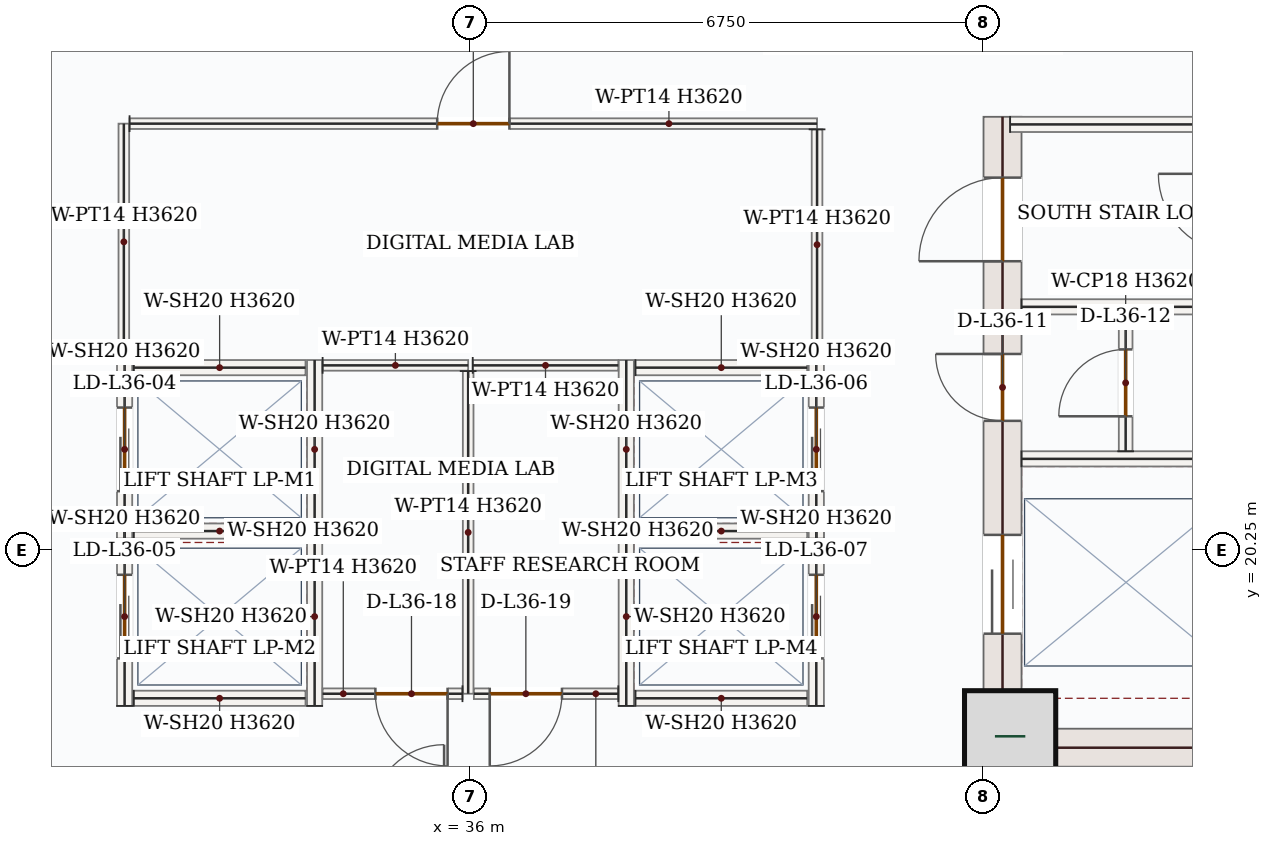
"""IFC4 building model, lengths in metres.
Left out: names, types, materials, properties, quantities, classifications, styles, units other than length and angle.
Written with IfcOpenShell. Run it as: python <this file> out.ifc"""

import sys

from ifc_helpers import new_model, si_unit, direction, frame, frame_2d, origin, origin_2d, place, context, subcontext, project, spatial, rectangle, extrude, source, transform, mapped, element, fill, save


model = new_model("IFC4")
c1 = context("Model", 3, precision=1e-05, world=origin(), true_north=direction((0.0, 1.0)))
c2 = subcontext(c1, "Body", "Model", "MODEL_VIEW")
j1 = project(units=[si_unit("LENGTHUNIT", "METRE"), si_unit("PLANEANGLEUNIT", "RADIAN")], contexts=[c1])
p1 = place(None, origin())
s1 = spatial("IfcSite", under=j1, at=p1, CompositionType="ELEMENT")
p2 = place(p1, origin())
s2 = spatial("IfcBuilding", under=s1, at=p2, CompositionType="ELEMENT")
p3 = place(p2, frame((0.0, 0.0, 159.0)))
s3 = spatial("IfcBuildingStorey", under=s2, at=p3, CompositionType="ELEMENT", Elevation=159.0)
p4 = place(p3, frame((43.0, 17.4, 0.0), z_axis=(0.0, 0.0, 1.0), x_axis=(0.0, 1.0, 0.0)))
e1 = element("IfcWall", 1, at=p4, inside=s3, PredefinedType="SHEAR", context=c2, shape_type="SweptSolid", body=[
    extrude(rectangle(XDim=8.55, YDim=0.5, at=frame_2d((4.275, 0.0))), origin(), (0.0, 0.0, 1.0), 3.62),
])
p5 = place(p4, frame((6.65, 0.0, 0.0)))
e2 = element("IfcOpeningElement", 2, at=p5, cuts=e1, PredefinedType="OPENING", context=c2, shape_type="SweptSolid", body=[
    extrude(rectangle(XDim=1.1, YDim=2.2, at=frame_2d((0.55, 1.1))), frame((0.0, 0.26, 0.0), z_axis=(0.0, -1.0, 0.0), x_axis=(1.0, 0.0, 0.0)), (0.0, 0.0, 1.0), 0.52),
])
p6 = place(p4, frame((1.75, 0.0, 0.0)))
e3 = element("IfcOpeningElement", 3, at=p6, cuts=e1, PredefinedType="OPENING", context=c2, shape_type="SweptSolid", body=[
    extrude(rectangle(XDim=1.3, YDim=2.2, at=frame_2d((0.65, 1.1))), frame((0.0, 0.26, 0.0), z_axis=(0.0, -1.0, 0.0), x_axis=(1.0, 0.0, 0.0)), (0.0, 0.0, 1.0), 0.52),
])
p7 = place(p4, frame((4.55, 0.0, 0.0)))
e4 = element("IfcOpeningElement", 4, at=p7, cuts=e1, PredefinedType="OPENING", context=c2, shape_type="SweptSolid", body=[
    extrude(rectangle(XDim=0.88, YDim=2.1, at=frame_2d((0.44, 1.05))), frame((0.0, 0.26, 0.0), z_axis=(0.0, -1.0, 0.0), x_axis=(1.0, 0.0, 0.0)), (0.0, 0.0, 1.0), 0.52),
])
m1 = source(origin(), c2, "Body", "SweptSolid", [
    extrude(rectangle(XDim=7.0, YDim=0.5, at=frame_2d((3.5, 0.0))), origin(), (0.0, 0.0, 1.0), 3.62),
])
p8 = place(p3, frame((43.25, 17.65, 0.0), z_axis=(0.0, 0.0, 1.0), x_axis=(1.0, 0.0, 0.0)))
e5 = element("IfcWall", 5, at=p8, inside=s3, PredefinedType="SHEAR", context=c2, shape_type="MappedRepresentation", body=[
    mapped(m1, transform((0.0, 0.0, 0.0), x_axis=(1.0, 0.0, 0.0), y_axis=(0.0, 1.0, 0.0), z_axis=(0.0, 0.0, 1.0), scale=1.0)),
])
m2 = source(origin(), c2, "Body", "SweptSolid", [
    extrude(rectangle(XDim=1.2, YDim=1.2, at=origin_2d()), origin(), (0.0, 0.0, 1.0), 3.9),
])
p9 = place(p3, frame((43.1, 17.8, 0.0), z_axis=(0.0, 0.0, 1.0), x_axis=(1.0, 0.0, 0.0)))
e6 = element("IfcColumn", 6, at=p9, inside=s3, PredefinedType="COLUMN", context=c2, shape_type="MappedRepresentation", body=[
    mapped(m2, transform((0.0, 0.0, 0.0), x_axis=(1.0, 0.0, 0.0), y_axis=(0.0, 1.0, 0.0), z_axis=(0.0, 0.0, 1.0), scale=1.0)),
])
m3 = source(origin(), c2, "Body", "SweptSolid", [
    extrude(rectangle(XDim=3.0, YDim=0.2, at=frame_2d((1.5, 0.0))), origin(), (0.0, 0.0, 1.0), 3.62),
])
p10 = place(p3, frame((43.1, 25.85, 0.0), z_axis=(0.0, 0.0, 1.0), x_axis=(1.0, 0.0, 0.0)))
e7 = element("IfcWall", 7, at=p10, inside=s3, PredefinedType="SOLIDWALL", context=c2, shape_type="MappedRepresentation", body=[
    mapped(m3, transform((0.0, 0.0, 0.0), x_axis=(1.0, 0.0, 0.0), y_axis=(0.0, 1.0, 0.0), z_axis=(0.0, 0.0, 1.0), scale=1.0)),
])
m4 = source(origin(), c2, "Body", "SweptSolid", [
    extrude(rectangle(XDim=2.75, YDim=0.2, at=frame_2d((1.375, 0.0))), origin(), (0.0, 0.0, 1.0), 3.62),
])
for number, where, z_axis, x_axis in (
    (8, (43.25, 23.45, 0.0), (0.0, 0.0, 1.0), (1.0, 0.0, 0.0)),
    (9, (43.25, 21.45, 0.0), (0.0, 0.0, 1.0), (1.0, 0.0, 0.0)),
):
    element("IfcWall", number, at=place(p3, frame(where, z_axis=z_axis, x_axis=x_axis)), inside=s3, PredefinedType="SOLIDWALL", context=c2, shape_type="MappedRepresentation", body=[
        mapped(m4, transform((0.0, 0.0, 0.0), x_axis=(1.0, 0.0, 0.0), y_axis=(0.0, 1.0, 0.0), z_axis=(0.0, 0.0, 1.0), scale=1.0)),
    ])
p11 = place(p3, frame((44.62, 21.55, 0.0), z_axis=(0.0, 0.0, 1.0), x_axis=(0.0, 1.0, 0.0)))
e10 = element("IfcWall", 10, at=p11, inside=s3, PredefinedType="PARTITIONING", context=c2, shape_type="SweptSolid", body=[
    extrude(rectangle(XDim=1.8, YDim=0.18, at=frame_2d((0.9, 0.0))), origin(), (0.0, 0.0, 1.0), 3.62),
])
p12 = place(p11, frame((0.46, 0.0, 0.0)))
e11 = element("IfcOpeningElement", 11, at=p12, cuts=e10, PredefinedType="OPENING", context=c2, shape_type="SweptSolid", body=[
    extrude(rectangle(XDim=0.88, YDim=2.1, at=frame_2d((0.44, 1.05))), frame((0.0, 0.1, 0.0), z_axis=(0.0, -1.0, 0.0), x_axis=(1.0, 0.0, 0.0)), (0.0, 0.0, 1.0), 0.2),
])
p13 = place(p3, frame((31.45, 20.4, 0.0), z_axis=(0.0, 0.0, 1.0), x_axis=(0.0, 1.0, 0.0)))
e12 = element("IfcWall", 12, at=p13, inside=s3, PredefinedType="SOLIDWALL", context=c2, shape_type="SweptSolid", body=[
    extrude(rectangle(XDim=2.35, YDim=0.2, at=frame_2d((1.175, 0.0))), origin(), (0.0, 0.0, 1.0), 3.62),
])
p14 = place(p13, frame((0.625, 0.0, 0.0)))
e13 = element("IfcOpeningElement", 13, at=p14, cuts=e12, PredefinedType="OPENING", context=c2, shape_type="SweptSolid", body=[
    extrude(rectangle(XDim=1.1, YDim=2.15, at=frame_2d((0.55, 1.075))), frame((0.0, 0.11, 0.0), z_axis=(0.0, -1.0, 0.0), x_axis=(1.0, 0.0, 0.0)), (0.0, 0.0, 1.0), 0.22),
])
m5 = source(origin(), c2, "Body", "SweptSolid", [
    extrude(rectangle(XDim=2.35, YDim=0.2, at=frame_2d((1.175, 0.0))), origin(), (0.0, 0.0, 1.0), 3.62),
])
p15 = place(p3, frame((33.95, 20.4, 0.0), z_axis=(0.0, 0.0, 1.0), x_axis=(0.0, 1.0, 0.0)))
e14 = element("IfcWall", 14, at=p15, inside=s3, PredefinedType="SOLIDWALL", context=c2, shape_type="MappedRepresentation", body=[
    mapped(m5, transform((0.0, 0.0, 0.0), x_axis=(1.0, 0.0, 0.0), y_axis=(0.0, 1.0, 0.0), z_axis=(0.0, 0.0, 1.0), scale=1.0)),
])
m6 = source(origin(), c2, "Body", "SweptSolid", [
    extrude(rectangle(XDim=2.26, YDim=0.2, at=frame_2d((1.13, 0.0))), origin(), (0.0, 0.0, 1.0), 3.62),
])
for number, where, z_axis, x_axis in (
    (15, (31.57, 20.5, 0.0), (0.0, 0.0, 1.0), (1.0, 0.0, 0.0)),
    (16, (31.57, 22.65, 0.0), (0.0, 0.0, 1.0), (1.0, 0.0, 0.0)),
):
    element("IfcWall", number, at=place(p3, frame(where, z_axis=z_axis, x_axis=x_axis)), inside=s3, PredefinedType="SOLIDWALL", context=c2, shape_type="MappedRepresentation", body=[
        mapped(m6, transform((0.0, 0.0, 0.0), x_axis=(1.0, 0.0, 0.0), y_axis=(0.0, 1.0, 0.0), z_axis=(0.0, 0.0, 1.0), scale=1.0)),
    ])
p16 = place(p3, frame((31.45, 18.2, 0.0), z_axis=(0.0, 0.0, 1.0), x_axis=(0.0, 1.0, 0.0)))
e17 = element("IfcWall", 17, at=p16, inside=s3, PredefinedType="SOLIDWALL", context=c2, shape_type="SweptSolid", body=[
    extrude(rectangle(XDim=2.35, YDim=0.2, at=frame_2d((1.175, 0.0))), origin(), (0.0, 0.0, 1.0), 3.62),
])
p17 = place(p16, frame((0.625, 0.0, 0.0)))
e18 = element("IfcOpeningElement", 18, at=p17, cuts=e17, PredefinedType="OPENING", context=c2, shape_type="SweptSolid", body=[
    extrude(rectangle(XDim=1.1, YDim=2.15, at=frame_2d((0.55, 1.075))), frame((0.0, 0.11, 0.0), z_axis=(0.0, -1.0, 0.0), x_axis=(1.0, 0.0, 0.0)), (0.0, 0.0, 1.0), 0.22),
])
p18 = place(p3, frame((33.95, 18.2, 0.0), z_axis=(0.0, 0.0, 1.0), x_axis=(0.0, 1.0, 0.0)))
e19 = element("IfcWall", 19, at=p18, inside=s3, PredefinedType="SOLIDWALL", context=c2, shape_type="MappedRepresentation", body=[
    mapped(m5, transform((0.0, 0.0, 0.0), x_axis=(1.0, 0.0, 0.0), y_axis=(0.0, 1.0, 0.0), z_axis=(0.0, 0.0, 1.0), scale=1.0)),
])
p19 = place(p3, frame((31.57, 18.3, 0.0), z_axis=(0.0, 0.0, 1.0), x_axis=(1.0, 0.0, 0.0)))
e20 = element("IfcWall", 20, at=p19, inside=s3, PredefinedType="SOLIDWALL", context=c2, shape_type="MappedRepresentation", body=[
    mapped(m6, transform((0.0, 0.0, 0.0), x_axis=(1.0, 0.0, 0.0), y_axis=(0.0, 1.0, 0.0), z_axis=(0.0, 0.0, 1.0), scale=1.0)),
])
p20 = place(p3, frame((38.05, 20.4, 0.0), z_axis=(0.0, 0.0, 1.0), x_axis=(0.0, 1.0, 0.0)))
e21 = element("IfcWall", 21, at=p20, inside=s3, PredefinedType="SOLIDWALL", context=c2, shape_type="MappedRepresentation", body=[
    mapped(m5, transform((0.0, 0.0, 0.0), x_axis=(1.0, 0.0, 0.0), y_axis=(0.0, 1.0, 0.0), z_axis=(0.0, 0.0, 1.0), scale=1.0)),
])
p21 = place(p3, frame((40.55, 20.4, 0.0), z_axis=(0.0, 0.0, 1.0), x_axis=(0.0, 1.0, 0.0)))
e22 = element("IfcWall", 22, at=p21, inside=s3, PredefinedType="SOLIDWALL", context=c2, shape_type="SweptSolid", body=[
    extrude(rectangle(XDim=2.35, YDim=0.2, at=frame_2d((1.175, 0.0))), origin(), (0.0, 0.0, 1.0), 3.62),
])
p22 = place(p21, frame((0.625, 0.0, 0.0)))
e23 = element("IfcOpeningElement", 23, at=p22, cuts=e22, PredefinedType="OPENING", context=c2, shape_type="SweptSolid", body=[
    extrude(rectangle(XDim=1.1, YDim=2.15, at=frame_2d((0.55, 1.075))), frame((0.0, 0.11, 0.0), z_axis=(0.0, -1.0, 0.0), x_axis=(1.0, 0.0, 0.0)), (0.0, 0.0, 1.0), 0.22),
])
for number, where, z_axis, x_axis in (
    (24, (38.17, 20.5, 0.0), (0.0, 0.0, 1.0), (1.0, 0.0, 0.0)),
    (25, (38.17, 22.65, 0.0), (0.0, 0.0, 1.0), (1.0, 0.0, 0.0)),
):
    element("IfcWall", number, at=place(p3, frame(where, z_axis=z_axis, x_axis=x_axis)), inside=s3, PredefinedType="SOLIDWALL", context=c2, shape_type="MappedRepresentation", body=[
        mapped(m6, transform((0.0, 0.0, 0.0), x_axis=(1.0, 0.0, 0.0), y_axis=(0.0, 1.0, 0.0), z_axis=(0.0, 0.0, 1.0), scale=1.0)),
    ])
p23 = place(p3, frame((38.05, 18.2, 0.0), z_axis=(0.0, 0.0, 1.0), x_axis=(0.0, 1.0, 0.0)))
e26 = element("IfcWall", 26, at=p23, inside=s3, PredefinedType="SOLIDWALL", context=c2, shape_type="MappedRepresentation", body=[
    mapped(m5, transform((0.0, 0.0, 0.0), x_axis=(1.0, 0.0, 0.0), y_axis=(0.0, 1.0, 0.0), z_axis=(0.0, 0.0, 1.0), scale=1.0)),
])
p24 = place(p3, frame((40.55, 18.2, 0.0), z_axis=(0.0, 0.0, 1.0), x_axis=(0.0, 1.0, 0.0)))
e27 = element("IfcWall", 27, at=p24, inside=s3, PredefinedType="SOLIDWALL", context=c2, shape_type="SweptSolid", body=[
    extrude(rectangle(XDim=2.35, YDim=0.2, at=frame_2d((1.175, 0.0))), origin(), (0.0, 0.0, 1.0), 3.62),
])
p25 = place(p24, frame((0.625, 0.0, 0.0)))
e28 = element("IfcOpeningElement", 28, at=p25, cuts=e27, PredefinedType="OPENING", context=c2, shape_type="SweptSolid", body=[
    extrude(rectangle(XDim=1.1, YDim=2.15, at=frame_2d((0.55, 1.075))), frame((0.0, 0.11, 0.0), z_axis=(0.0, -1.0, 0.0), x_axis=(1.0, 0.0, 0.0)), (0.0, 0.0, 1.0), 0.22),
])
p26 = place(p3, frame((38.17, 18.3, 0.0), z_axis=(0.0, 0.0, 1.0), x_axis=(1.0, 0.0, 0.0)))
e29 = element("IfcWall", 29, at=p26, inside=s3, PredefinedType="SOLIDWALL", context=c2, shape_type="MappedRepresentation", body=[
    mapped(m6, transform((0.0, 0.0, 0.0), x_axis=(1.0, 0.0, 0.0), y_axis=(0.0, 1.0, 0.0), z_axis=(0.0, 0.0, 1.0), scale=1.0)),
])
m7 = source(origin(), c2, "Body", "SweptSolid", [
    extrude(rectangle(XDim=1.915, YDim=0.14, at=frame_2d((0.958, 0.0))), origin(), (0.0, 0.0, 1.0), 3.62),
])
p27 = place(p3, frame((34.055, 22.68, 0.0), z_axis=(0.0, 0.0, 1.0), x_axis=(1.0, 0.0, 0.0)))
e30 = element("IfcWall", 30, at=p27, inside=s3, PredefinedType="PARTITIONING", context=c2, shape_type="MappedRepresentation", body=[
    mapped(m7, transform((0.0, 0.0, 0.0), x_axis=(1.0, 0.0, 0.0), y_axis=(0.0, 1.0, 0.0), z_axis=(0.0, 0.0, 1.0), scale=1.0)),
])
m8 = source(origin(), c2, "Body", "SweptSolid", [
    extrude(rectangle(XDim=4.245, YDim=0.14, at=frame_2d((2.123, 0.0))), origin(), (0.0, 0.0, 1.0), 3.62),
])
p28 = place(p3, frame((35.97, 22.605, 0.0), z_axis=(0.0, 0.0, 1.0), x_axis=(0.0, -1.0, 0.0)))
e31 = element("IfcWall", 31, at=p28, inside=s3, PredefinedType="PARTITIONING", context=c2, shape_type="MappedRepresentation", body=[
    mapped(m8, transform((0.0, 0.0, 0.0), x_axis=(1.0, 0.0, 0.0), y_axis=(0.0, 1.0, 0.0), z_axis=(0.0, 0.0, 1.0), scale=1.0)),
])
p29 = place(p3, frame((35.895, 18.36, 0.0), z_axis=(0.0, 0.0, 1.0), x_axis=(-1.0, 0.0, 0.0)))
e32 = element("IfcWall", 32, at=p29, inside=s3, PredefinedType="PARTITIONING", context=c2, shape_type="SweptSolid", body=[
    extrude(rectangle(XDim=1.84, YDim=0.14, at=frame_2d((0.92, 0.0))), origin(), (0.0, 0.0, 1.0), 3.62),
])
p30 = place(p29, frame((0.196, 0.0, 0.0)))
e33 = element("IfcOpeningElement", 33, at=p30, cuts=e32, PredefinedType="OPENING", context=c2, shape_type="SweptSolid", body=[
    extrude(rectangle(XDim=0.95, YDim=2.15, at=frame_2d((0.475, 1.075))), frame((0.0, 0.08, 0.0), z_axis=(0.0, -1.0, 0.0), x_axis=(1.0, 0.0, 0.0)), (0.0, 0.0, 1.0), 0.16),
])
p31 = place(p3, frame((36.03, 22.68, 0.0), z_axis=(0.0, 0.0, 1.0), x_axis=(1.0, 0.0, 0.0)))
e34 = element("IfcWall", 34, at=p31, inside=s3, PredefinedType="PARTITIONING", context=c2, shape_type="MappedRepresentation", body=[
    mapped(m7, transform((0.0, 0.0, 0.0), x_axis=(1.0, 0.0, 0.0), y_axis=(0.0, 1.0, 0.0), z_axis=(0.0, 0.0, 1.0), scale=1.0)),
])
p32 = place(p3, frame((37.945, 18.36, 0.0), z_axis=(0.0, 0.0, 1.0), x_axis=(-1.0, 0.0, 0.0)))
e35 = element("IfcWall", 35, at=p32, inside=s3, PredefinedType="PARTITIONING", context=c2, shape_type="SweptSolid", body=[
    extrude(rectangle(XDim=1.9, YDim=0.14, at=frame_2d((0.95, 0.0))), origin(), (0.0, 0.0, 1.0), 3.62),
])
p33 = place(p32, frame((0.741, 0.0, 0.0)))
e36 = element("IfcOpeningElement", 36, at=p33, cuts=e35, PredefinedType="OPENING", context=c2, shape_type="SweptSolid", body=[
    extrude(rectangle(XDim=0.95, YDim=2.15, at=frame_2d((0.475, 1.075))), frame((0.0, 0.08, 0.0), z_axis=(0.0, -1.0, 0.0), x_axis=(1.0, 0.0, 0.0)), (0.0, 0.0, 1.0), 0.16),
])
m9 = source(origin(), c2, "Body", "SweptSolid", [
    extrude(rectangle(XDim=3.11, YDim=0.14, at=frame_2d((1.555, 0.0))), origin(), (0.0, 0.0, 1.0), 3.62),
])
p34 = place(p3, frame((31.44, 22.75, 0.0), z_axis=(0.0, 0.0, 1.0), x_axis=(0.0, 1.0, 0.0)))
e37 = element("IfcWall", 37, at=p34, inside=s3, PredefinedType="PARTITIONING", context=c2, shape_type="MappedRepresentation", body=[
    mapped(m9, transform((0.0, 0.0, 0.0), x_axis=(1.0, 0.0, 0.0), y_axis=(0.0, 1.0, 0.0), z_axis=(0.0, 0.0, 1.0), scale=1.0)),
])
p35 = place(p3, frame((31.515, 25.86, 0.0), z_axis=(0.0, 0.0, 1.0), x_axis=(1.0, 0.0, 0.0)))
e38 = element("IfcWall", 38, at=p35, inside=s3, PredefinedType="PARTITIONING", context=c2, shape_type="SweptSolid", body=[
    extrude(rectangle(XDim=9.045, YDim=0.14, at=frame_2d((4.522, 0.0))), origin(), (0.0, 0.0, 1.0), 3.62),
])
p36 = place(p35, frame((4.048, 0.0, 0.0)))
e39 = element("IfcOpeningElement", 39, at=p36, cuts=e38, PredefinedType="OPENING", context=c2, shape_type="SweptSolid", body=[
    extrude(rectangle(XDim=0.95, YDim=2.15, at=frame_2d((0.475, 1.075))), frame((0.0, 0.08, 0.0), z_axis=(0.0, -1.0, 0.0), x_axis=(1.0, 0.0, 0.0)), (0.0, 0.0, 1.0), 0.16),
])
m10 = source(origin(), c2, "Body", "SweptSolid", [
    extrude(rectangle(XDim=3.035, YDim=0.14, at=frame_2d((1.518, 0.0))), origin(), (0.0, 0.0, 1.0), 3.62),
])
p37 = place(p3, frame((40.56, 25.785, 0.0), z_axis=(0.0, 0.0, 1.0), x_axis=(0.0, -1.0, 0.0)))
e40 = element("IfcWall", 40, at=p37, inside=s3, PredefinedType="PARTITIONING", context=c2, shape_type="MappedRepresentation", body=[
    mapped(m10, transform((0.0, 0.0, 0.0), x_axis=(1.0, 0.0, 0.0), y_axis=(0.0, 1.0, 0.0), z_axis=(0.0, 0.0, 1.0), scale=1.0)),
])
m11 = source(origin(), c2, "Body", "SweptSolid", [
    extrude(rectangle(XDim=1.1, YDim=2.2, at=frame_2d((0.55, 1.1))), frame((0.0, 0.025, 0.0), z_axis=(0.0, -1.0, 0.0), x_axis=(1.0, 0.0, 0.0)), (0.0, 0.0, 1.0), 0.05),
])
p38 = place(p5, origin())
e41 = element("IfcDoor", 41, at=p38, inside=s3, OperationType="SINGLE_SWING_LEFT", PredefinedType="DOOR", context=c2, shape_type="MappedRepresentation", body=[
    mapped(m11, transform((0.0, 0.0, 0.0), x_axis=(1.0, 0.0, 0.0), y_axis=(0.0, 1.0, 0.0), z_axis=(0.0, 0.0, 1.0), scale=1.0)),
])
fill(e2, e41)
m12 = source(origin(), c2, "Body", "SweptSolid", [
    extrude(rectangle(XDim=1.3, YDim=2.2, at=frame_2d((0.65, 1.1))), frame((0.0, 0.025, 0.0), z_axis=(0.0, -1.0, 0.0), x_axis=(1.0, 0.0, 0.0)), (0.0, 0.0, 1.0), 0.05),
])
p39 = place(p6, origin())
e42 = element("IfcDoor", 42, at=p39, inside=s3, OperationType="DOUBLE_DOOR_SLIDING", PredefinedType="DOOR", context=c2, shape_type="MappedRepresentation", body=[
    mapped(m12, transform((0.0, 0.0, 0.0), x_axis=(1.0, 0.0, 0.0), y_axis=(0.0, 1.0, 0.0), z_axis=(0.0, 0.0, 1.0), scale=1.0)),
])
fill(e3, e42)
m13 = source(origin(), c2, "Body", "SweptSolid", [
    extrude(rectangle(XDim=0.88, YDim=2.1, at=frame_2d((0.44, 1.05))), frame((0.0, 0.025, 0.0), z_axis=(0.0, -1.0, 0.0), x_axis=(1.0, 0.0, 0.0)), (0.0, 0.0, 1.0), 0.05),
])
p40 = place(p7, origin())
e43 = element("IfcDoor", 43, at=p40, inside=s3, OperationType="SINGLE_SWING_RIGHT", PredefinedType="DOOR", context=c2, shape_type="MappedRepresentation", body=[
    mapped(m13, transform((0.0, 0.0, 0.0), x_axis=(1.0, 0.0, 0.0), y_axis=(0.0, 1.0, 0.0), z_axis=(0.0, 0.0, 1.0), scale=1.0)),
])
fill(e4, e43)
p41 = place(p12, origin())
e44 = element("IfcDoor", 44, at=p41, inside=s3, OperationType="SINGLE_SWING_LEFT", PredefinedType="DOOR", context=c2, shape_type="MappedRepresentation", body=[
    mapped(m13, transform((0.0, 0.0, 0.0), x_axis=(1.0, 0.0, 0.0), y_axis=(0.0, 1.0, 0.0), z_axis=(0.0, 0.0, 1.0), scale=1.0)),
])
fill(e11, e44)
m14 = source(origin(), c2, "Body", "SweptSolid", [
    extrude(rectangle(XDim=1.1, YDim=2.15, at=frame_2d((0.55, 1.075))), frame((0.0, 0.025, 0.0), z_axis=(0.0, -1.0, 0.0), x_axis=(1.0, 0.0, 0.0)), (0.0, 0.0, 1.0), 0.05),
])
p42 = place(p14, origin())
e45 = element("IfcDoor", 45, at=p42, inside=s3, OperationType="DOUBLE_DOOR_SLIDING", PredefinedType="DOOR", context=c2, shape_type="MappedRepresentation", body=[
    mapped(m14, transform((0.0, 0.0, 0.0), x_axis=(1.0, 0.0, 0.0), y_axis=(0.0, 1.0, 0.0), z_axis=(0.0, 0.0, 1.0), scale=1.0)),
])
fill(e13, e45)
p43 = place(p17, origin())
e46 = element("IfcDoor", 46, at=p43, inside=s3, OperationType="DOUBLE_DOOR_SLIDING", PredefinedType="DOOR", context=c2, shape_type="MappedRepresentation", body=[
    mapped(m14, transform((0.0, 0.0, 0.0), x_axis=(1.0, 0.0, 0.0), y_axis=(0.0, 1.0, 0.0), z_axis=(0.0, 0.0, 1.0), scale=1.0)),
])
fill(e18, e46)
p44 = place(p22, origin())
e47 = element("IfcDoor", 47, at=p44, inside=s3, OperationType="DOUBLE_DOOR_SLIDING", PredefinedType="DOOR", context=c2, shape_type="MappedRepresentation", body=[
    mapped(m14, transform((0.0, 0.0, 0.0), x_axis=(1.0, 0.0, 0.0), y_axis=(0.0, 1.0, 0.0), z_axis=(0.0, 0.0, 1.0), scale=1.0)),
])
fill(e23, e47)
p45 = place(p25, origin())
e48 = element("IfcDoor", 48, at=p45, inside=s3, OperationType="DOUBLE_DOOR_SLIDING", PredefinedType="DOOR", context=c2, shape_type="MappedRepresentation", body=[
    mapped(m14, transform((0.0, 0.0, 0.0), x_axis=(1.0, 0.0, 0.0), y_axis=(0.0, 1.0, 0.0), z_axis=(0.0, 0.0, 1.0), scale=1.0)),
])
fill(e28, e48)
m15 = source(origin(), c2, "Body", "SweptSolid", [
    extrude(rectangle(XDim=0.95, YDim=2.15, at=frame_2d((0.475, 1.075))), frame((0.0, 0.025, 0.0), z_axis=(0.0, -1.0, 0.0), x_axis=(1.0, 0.0, 0.0)), (0.0, 0.0, 1.0), 0.05),
])
p46 = place(p36, origin())
e49 = element("IfcDoor", 49, at=p46, inside=s3, OperationType="SINGLE_SWING_RIGHT", PredefinedType="DOOR", context=c2, shape_type="MappedRepresentation", body=[
    mapped(m15, transform((0.0, 0.0, 0.0), x_axis=(1.0, 0.0, 0.0), y_axis=(0.0, 1.0, 0.0), z_axis=(0.0, 0.0, 1.0), scale=1.0)),
])
fill(e39, e49)
p47 = place(p30, origin())
e50 = element("IfcDoor", 50, at=p47, inside=s3, OperationType="SINGLE_SWING_LEFT", PredefinedType="DOOR", context=c2, shape_type="MappedRepresentation", body=[
    mapped(m15, transform((0.0, 0.0, 0.0), x_axis=(1.0, 0.0, 0.0), y_axis=(0.0, 1.0, 0.0), z_axis=(0.0, 0.0, 1.0), scale=1.0)),
])
fill(e33, e50)
p48 = place(p33, origin())
e51 = element("IfcDoor", 51, at=p48, inside=s3, OperationType="SINGLE_SWING_RIGHT", PredefinedType="DOOR", context=c2, shape_type="MappedRepresentation", body=[
    mapped(m15, transform((0.0, 0.0, 0.0), x_axis=(1.0, 0.0, 0.0), y_axis=(0.0, 1.0, 0.0), z_axis=(0.0, 0.0, 1.0), scale=1.0)),
])
fill(e36, e51)
save(model, sys.argv[1])
